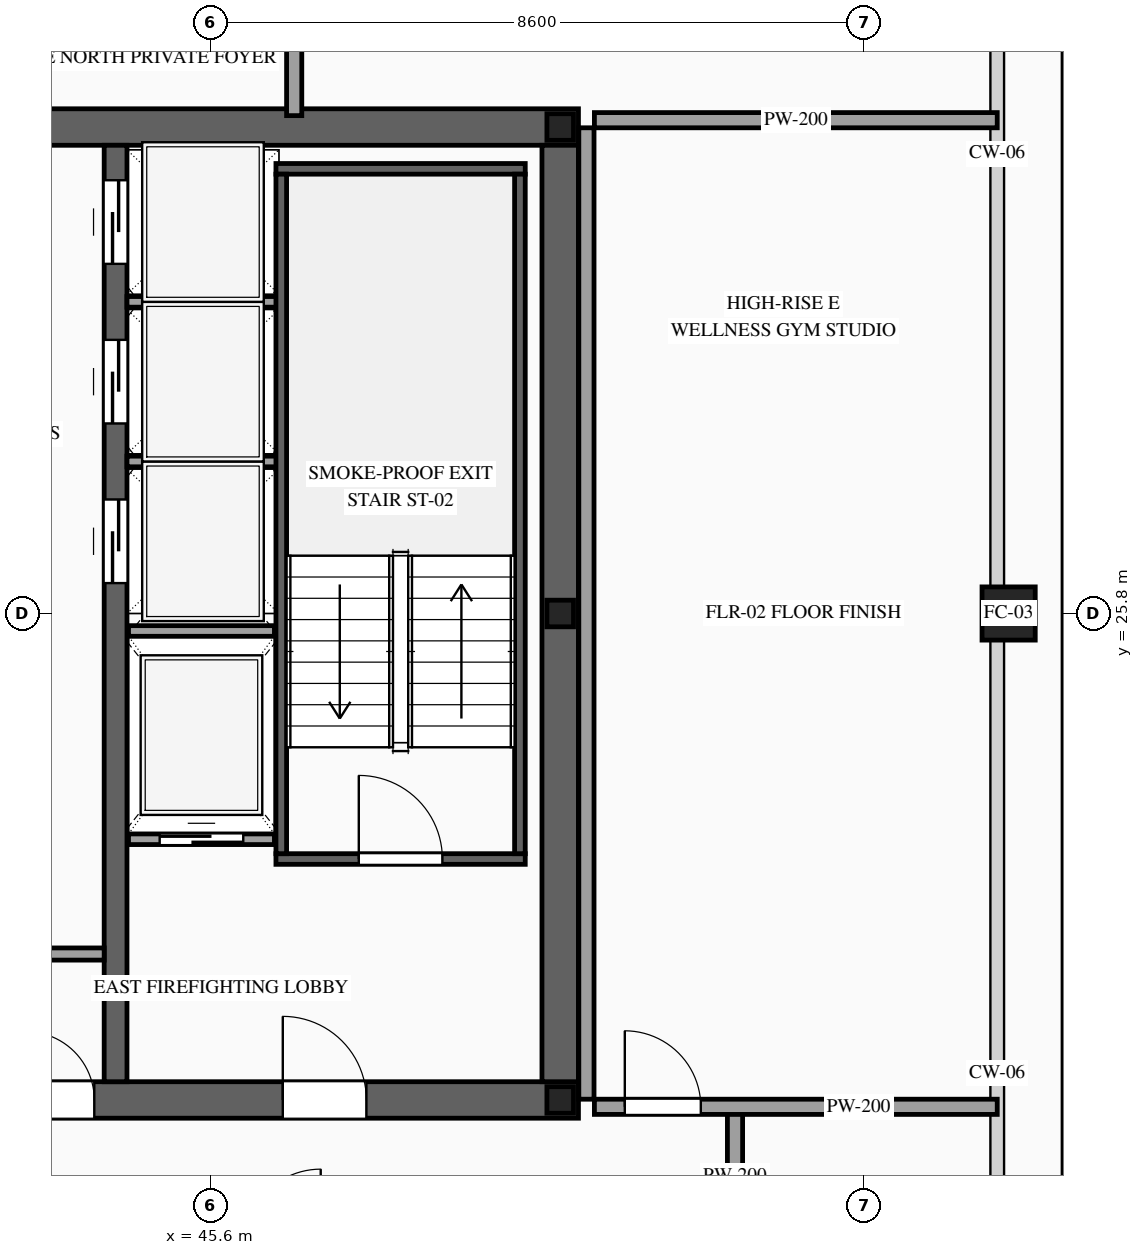
"""IFC4 building model, lengths in metres.
Left out: names, types, materials, properties, quantities, classifications, styles, units other than length and angle.
Written with IfcOpenShell. Run it as: python <this file> out.ifc"""

import sys

from ifc_helpers import new_model, si_unit, direction, frame, frame_2d, origin, origin_2d, place, context, subcontext, project, spatial, rectangle, hollow_rectangle, i_section, extrude, source, transform, mapped, element, fill, save


model = new_model("IFC4")
c1 = context("Model", 3, precision=1e-05, world=origin(), true_north=direction((0.0, 1.0)))
c2 = subcontext(c1, "Body", "Model", "MODEL_VIEW")
j1 = project(units=[si_unit("LENGTHUNIT", "METRE"), si_unit("PLANEANGLEUNIT", "RADIAN")], contexts=[c1])
p1 = place(None, origin())
s1 = spatial("IfcSite", under=j1, at=p1, CompositionType="ELEMENT")
p2 = place(p1, origin())
s2 = spatial("IfcBuilding", under=s1, at=p2, CompositionType="ELEMENT")
p3 = place(p2, frame((0.0, 0.0, 296.1)))
s3 = spatial("IfcBuildingStorey", under=s2, at=p3, CompositionType="ELEMENT", Elevation=296.1)
p4 = place(p3, frame((23.56, 19.4, 0.0), z_axis=(0.0, 0.0, 1.0), x_axis=(1.0, 0.0, 0.0)))
e1 = element("IfcWall", 1, at=p4, inside=s3, PredefinedType="SHEAR", context=c2, shape_type="SweptSolid", body=[
    extrude(rectangle(XDim=26.88, YDim=0.48, at=frame_2d((13.44, 0.0))), origin(), (0.0, 0.0, 1.0), 3.5),
])
p5 = place(p4, frame((1.89, 0.0, 0.0)))
e2 = element("IfcOpeningElement", 2, at=p5, cuts=e1, PredefinedType="OPENING", context=c2, shape_type="SweptSolid", body=[
    extrude(rectangle(XDim=1.1, YDim=2.2, at=frame_2d((0.55, 1.1))), frame((0.0, 0.255, 0.0), z_axis=(0.0, -1.0, 0.0), x_axis=(1.0, 0.0, 0.0)), (0.0, 0.0, 1.0), 0.51),
])
p6 = place(p4, frame((9.79, 0.0, 0.0)))
e3 = element("IfcOpeningElement", 3, at=p6, cuts=e1, PredefinedType="OPENING", context=c2, shape_type="SweptSolid", body=[
    extrude(rectangle(XDim=1.1, YDim=2.2, at=frame_2d((0.55, 1.1))), frame((0.0, 0.255, 0.0), z_axis=(0.0, -1.0, 0.0), x_axis=(1.0, 0.0, 0.0)), (0.0, 0.0, 1.0), 0.51),
])
p7 = place(p4, frame((22.99, 0.0, 0.0)))
e4 = element("IfcOpeningElement", 4, at=p7, cuts=e1, PredefinedType="OPENING", context=c2, shape_type="SweptSolid", body=[
    extrude(rectangle(XDim=1.1, YDim=2.2, at=frame_2d((0.55, 1.1))), frame((0.0, 0.255, 0.0), z_axis=(0.0, -1.0, 0.0), x_axis=(1.0, 0.0, 0.0)), (0.0, 0.0, 1.0), 0.51),
])
p8 = place(p4, frame((19.61, 0.0, 0.0)))
e5 = element("IfcOpeningElement", 5, at=p8, cuts=e1, PredefinedType="OPENING", context=c2, shape_type="SweptSolid", body=[
    extrude(rectangle(XDim=0.9, YDim=2.15, at=frame_2d((0.45, 1.075))), frame((0.0, 0.255, 0.0), z_axis=(0.0, -1.0, 0.0), x_axis=(1.0, 0.0, 0.0)), (0.0, 0.0, 1.0), 0.51),
])
p9 = place(p4, frame((18.17, 0.0, 0.0)))
e6 = element("IfcOpeningElement", 6, at=p9, cuts=e1, PredefinedType="OPENING", context=c2, shape_type="SweptSolid", body=[
    extrude(rectangle(XDim=0.9, YDim=2.15, at=frame_2d((0.45, 1.075))), frame((0.0, 0.255, 0.0), z_axis=(0.0, -1.0, 0.0), x_axis=(1.0, 0.0, 0.0)), (0.0, 0.0, 1.0), 0.51),
])
p10 = place(p3, frame((23.56, 32.2, 0.0), z_axis=(0.0, 0.0, 1.0), x_axis=(1.0, 0.0, 0.0)))
e7 = element("IfcWall", 7, at=p10, inside=s3, PredefinedType="SHEAR", context=c2, shape_type="SweptSolid", body=[
    extrude(rectangle(XDim=26.88, YDim=0.48, at=frame_2d((13.44, 0.0))), origin(), (0.0, 0.0, 1.0), 3.5),
])
p11 = place(p10, frame((4.51, 0.0, 0.0)))
e8 = element("IfcOpeningElement", 8, at=p11, cuts=e7, PredefinedType="OPENING", context=c2, shape_type="SweptSolid", body=[
    extrude(rectangle(XDim=0.9, YDim=2.15, at=frame_2d((0.45, 1.075))), frame((0.0, 0.255, 0.0), z_axis=(0.0, -1.0, 0.0), x_axis=(1.0, 0.0, 0.0)), (0.0, 0.0, 1.0), 0.51),
])
p12 = place(p10, frame((9.79, 0.0, 0.0)))
e9 = element("IfcOpeningElement", 9, at=p12, cuts=e7, PredefinedType="OPENING", context=c2, shape_type="SweptSolid", body=[
    extrude(rectangle(XDim=1.1, YDim=2.2, at=frame_2d((0.55, 1.1))), frame((0.0, 0.255, 0.0), z_axis=(0.0, -1.0, 0.0), x_axis=(1.0, 0.0, 0.0)), (0.0, 0.0, 1.0), 0.51),
])
p13 = place(p10, frame((15.64, 0.0, 0.0)))
e10 = element("IfcOpeningElement", 10, at=p13, cuts=e7, PredefinedType="OPENING", context=c2, shape_type="SweptSolid", body=[
    extrude(rectangle(XDim=1.1, YDim=2.2, at=frame_2d((0.55, 1.1))), frame((0.0, 0.255, 0.0), z_axis=(0.0, -1.0, 0.0), x_axis=(1.0, 0.0, 0.0)), (0.0, 0.0, 1.0), 0.51),
])
p14 = place(p10, frame((18.74, 0.0, 0.0)))
e11 = element("IfcOpeningElement", 11, at=p14, cuts=e7, PredefinedType="OPENING", context=c2, shape_type="SweptSolid", body=[
    extrude(rectangle(XDim=1.1, YDim=2.2, at=frame_2d((0.55, 1.1))), frame((0.0, 0.255, 0.0), z_axis=(0.0, -1.0, 0.0), x_axis=(1.0, 0.0, 0.0)), (0.0, 0.0, 1.0), 0.51),
])
m1 = source(origin(), c2, "Body", "SweptSolid", [
    extrude(rectangle(XDim=12.32, YDim=0.48, at=frame_2d((6.16, 0.0))), origin(), (0.0, 0.0, 1.0), 3.5),
])
p15 = place(p3, frame((50.2, 19.64, 0.0), z_axis=(0.0, 0.0, 1.0), x_axis=(0.0, 1.0, 0.0)))
e12 = element("IfcWall", 12, at=p15, inside=s3, PredefinedType="SHEAR", context=c2, shape_type="MappedRepresentation", body=[
    mapped(m1, transform((0.0, 0.0, 0.0), scale=1.0)),
])
p16 = place(p3, frame((44.35, 19.64, 0.0), z_axis=(0.0, 0.0, 1.0), x_axis=(0.0, 1.0, 0.0)))
e13 = element("IfcWall", 13, at=p16, inside=s3, PredefinedType="SOLIDWALL", context=c2, shape_type="SweptSolid", body=[
    extrude(rectangle(XDim=12.32, YDim=0.3, at=frame_2d((6.16, 0.0))), origin(), (0.0, 0.0, 1.0), 3.5),
])
p17 = place(p16, frame((6.56, 0.0, 0.0)))
e14 = element("IfcOpeningElement", 14, at=p17, cuts=e13, PredefinedType="OPENING", context=c2, shape_type="SweptSolid", body=[
    extrude(rectangle(XDim=1.1, YDim=2.2, at=frame_2d((0.55, 1.1))), frame((0.0, 0.165, 0.0), z_axis=(0.0, -1.0, 0.0), x_axis=(1.0, 0.0, 0.0)), (0.0, 0.0, 1.0), 0.33),
])
p18 = place(p16, frame((8.66, 0.0, 0.0)))
e15 = element("IfcOpeningElement", 15, at=p18, cuts=e13, PredefinedType="OPENING", context=c2, shape_type="SweptSolid", body=[
    extrude(rectangle(XDim=1.1, YDim=2.2, at=frame_2d((0.55, 1.1))), frame((0.0, 0.165, 0.0), z_axis=(0.0, -1.0, 0.0), x_axis=(1.0, 0.0, 0.0)), (0.0, 0.0, 1.0), 0.33),
])
p19 = place(p16, frame((10.76, 0.0, 0.0)))
e16 = element("IfcOpeningElement", 16, at=p19, cuts=e13, PredefinedType="OPENING", context=c2, shape_type="SweptSolid", body=[
    extrude(rectangle(XDim=1.1, YDim=2.2, at=frame_2d((0.55, 1.1))), frame((0.0, 0.165, 0.0), z_axis=(0.0, -1.0, 0.0), x_axis=(1.0, 0.0, 0.0)), (0.0, 0.0, 1.0), 0.33),
])
m2 = source(origin(), c2, "Body", "SweptSolid", [
    extrude(i_section(OverallWidth=0.35, OverallDepth=0.35, WebThickness=0.012, FlangeThickness=0.019, at=origin_2d()), origin(), (0.0, 0.0, 1.0), 3.5),
])
for number, where, z_axis, x_axis in (
    (17, (50.2, 19.4, 0.0), (0.0, 0.0, 1.0), (1.0, 0.0, 0.0)),
    (18, (50.2, 25.8, 0.0), (0.0, 0.0, 1.0), (1.0, 0.0, 0.0)),
    (19, (50.2, 32.2, 0.0), (0.0, 0.0, 1.0), (1.0, 0.0, 0.0)),
):
    element("IfcColumn", number, at=place(p3, frame(where, z_axis=z_axis, x_axis=x_axis)), inside=s3, PredefinedType="COLUMN", context=c2, shape_type="MappedRepresentation", body=[
        mapped(m2, transform((0.0, 0.0, 0.0), scale=1.0)),
    ])
m3 = source(origin(), c2, "Body", "SweptSolid", [
    extrude(hollow_rectangle(XDim=0.7, YDim=0.7, WallThickness=0.032, at=origin_2d()), origin(), (0.0, 0.0, 1.0), 3.5),
])
p20 = place(p3, frame((56.1, 25.8, 0.0), z_axis=(0.0, 0.0, 1.0), x_axis=(1.0, 0.0, 0.0)))
e20 = element("IfcColumn", 20, at=p20, inside=s3, PredefinedType="COLUMN", context=c2, shape_type="MappedRepresentation", body=[
    mapped(m3, transform((0.0, 0.0, 0.0), scale=1.0)),
])
p21 = place(p3, frame((44.52, 22.83, 0.0), z_axis=(0.0, 0.0, 1.0), x_axis=(1.0, 0.0, 0.0)))
e21 = element("IfcWall", 21, at=p21, inside=s3, PredefinedType="SOLIDWALL", context=c2, shape_type="SweptSolid", body=[
    extrude(rectangle(XDim=1.92, YDim=0.14, at=frame_2d((0.96, 0.0))), origin(), (0.0, 0.0, 1.0), 3.28),
])
p22 = place(p21, frame((0.41, 0.0, 0.0)))
e22 = element("IfcOpeningElement", 22, at=p22, cuts=e21, PredefinedType="OPENING", context=c2, shape_type="SweptSolid", body=[
    extrude(rectangle(XDim=1.1, YDim=2.2, at=frame_2d((0.55, 1.1))), frame((0.0, 0.085, 0.0), z_axis=(0.0, -1.0, 0.0), x_axis=(1.0, 0.0, 0.0)), (0.0, 0.0, 1.0), 0.17),
])
m4 = source(origin(), c2, "Body", "SweptSolid", [
    extrude(rectangle(XDim=1.92, YDim=0.14, at=frame_2d((0.96, 0.0))), origin(), (0.0, 0.0, 1.0), 3.28),
])
p23 = place(p3, frame((44.52, 25.57, 0.0), z_axis=(0.0, 0.0, 1.0), x_axis=(1.0, 0.0, 0.0)))
e23 = element("IfcWall", 23, at=p23, inside=s3, PredefinedType="SOLIDWALL", context=c2, shape_type="MappedRepresentation", body=[
    mapped(m4, transform((0.0, 0.0, 0.0), scale=1.0)),
])
m5 = source(origin(), c2, "Body", "SweptSolid", [
    extrude(rectangle(XDim=2.0, YDim=0.14, at=frame_2d((1.0, 0.0))), origin(), (0.0, 0.0, 1.0), 3.28),
])
for number, where, z_axis, x_axis in (
    (24, (44.5, 27.8, 0.0), (0.0, 0.0, 1.0), (1.0, 0.0, 0.0)),
    (25, (44.5, 29.9, 0.0), (0.0, 0.0, 1.0), (1.0, 0.0, 0.0)),
):
    element("IfcWall", number, at=place(p3, frame(where, z_axis=z_axis, x_axis=x_axis)), inside=s3, PredefinedType="SOLIDWALL", context=c2, shape_type="MappedRepresentation", body=[
        mapped(m5, transform((0.0, 0.0, 0.0), scale=1.0)),
    ])
p24 = place(p3, frame((46.46, 22.57, 0.0), z_axis=(0.0, 0.0, 1.0), x_axis=(1.0, 0.0, 0.0)))
e26 = element("IfcWall", 26, at=p24, inside=s3, PredefinedType="SOLIDWALL", context=c2, shape_type="SweptSolid", body=[
    extrude(rectangle(XDim=3.28, YDim=0.14, at=frame_2d((1.64, 0.0))), origin(), (0.0, 0.0, 1.0), 3.28),
])
p25 = place(p24, frame((1.09, 0.0, 0.0)))
e27 = element("IfcOpeningElement", 27, at=p25, cuts=e26, PredefinedType="OPENING", context=c2, shape_type="SweptSolid", body=[
    extrude(rectangle(XDim=1.1, YDim=2.2, at=frame_2d((0.55, 1.1))), frame((0.0, 0.085, 0.0), z_axis=(0.0, -1.0, 0.0), x_axis=(1.0, 0.0, 0.0)), (0.0, 0.0, 1.0), 0.17),
])
m6 = source(origin(), c2, "Body", "SweptSolid", [
    extrude(rectangle(XDim=3.28, YDim=0.14, at=frame_2d((1.64, 0.0))), origin(), (0.0, 0.0, 1.0), 3.28),
])
p26 = place(p3, frame((46.46, 31.65, 0.0), z_axis=(0.0, 0.0, 1.0), x_axis=(1.0, 0.0, 0.0)))
e28 = element("IfcWall", 28, at=p26, inside=s3, PredefinedType="SOLIDWALL", context=c2, shape_type="MappedRepresentation", body=[
    mapped(m6, transform((0.0, 0.0, 0.0), scale=1.0)),
])
m7 = source(origin(), c2, "Body", "SweptSolid", [
    extrude(rectangle(XDim=8.94, YDim=0.14, at=frame_2d((4.47, 0.0))), origin(), (0.0, 0.0, 1.0), 3.28),
])
for number, where, z_axis, x_axis in (
    (29, (46.53, 22.64, 0.0), (0.0, 0.0, 1.0), (0.0, 1.0, 0.0)),
    (30, (49.67, 22.64, 0.0), (0.0, 0.0, 1.0), (0.0, 1.0, 0.0)),
):
    element("IfcWall", number, at=place(p3, frame(where, z_axis=z_axis, x_axis=x_axis)), inside=s3, PredefinedType="SOLIDWALL", context=c2, shape_type="MappedRepresentation", body=[
        mapped(m7, transform((0.0, 0.0, 0.0), scale=1.0)),
    ])
m8 = source(origin(), c2, "Body", "SweptSolid", [
    extrude(rectangle(XDim=1.17, YDim=0.16, at=frame_2d((0.585, 0.0))), origin(), (0.0, 0.0, 1.0), 3.28),
])
p27 = place(p3, frame((43.03, 21.32, 0.0), z_axis=(0.0, 0.0, 1.0), x_axis=(1.0, 0.0, 0.0)))
e31 = element("IfcWall", 31, at=p27, inside=s3, PredefinedType="PARTITIONING", context=c2, shape_type="MappedRepresentation", body=[
    mapped(m8, transform((0.0, 0.0, 0.0), scale=1.0)),
])
m9 = source(origin(), c2, "Body", "SweptSolid", [
    extrude(rectangle(XDim=1.7, YDim=0.2, at=frame_2d((0.85, 0.0))), origin(), (0.0, 0.0, 1.0), 3.28),
])
for number, where, z_axis, x_axis in (
    (32, (46.7, 32.35, 0.0), (0.0, 0.0, 1.0), (0.0, 1.0, 0.0)),
    (33, (52.5, 17.55, 0.0), (0.0, 0.0, 1.0), (0.0, 1.0, 0.0)),
):
    element("IfcWall", number, at=place(p3, frame(where, z_axis=z_axis, x_axis=x_axis)), inside=s3, PredefinedType="PARTITIONING", context=c2, shape_type="MappedRepresentation", body=[
        mapped(m9, transform((0.0, 0.0, 0.0), scale=1.0)),
    ])
p28 = place(p3, frame((50.65, 19.31, 0.0), z_axis=(0.0, 0.0, 1.0), x_axis=(1.0, 0.0, 0.0)))
e34 = element("IfcWall", 34, at=p28, inside=s3, PredefinedType="PARTITIONING", context=c2, shape_type="SweptSolid", body=[
    extrude(rectangle(XDim=5.3, YDim=0.2, at=frame_2d((2.65, 0.0))), origin(), (0.0, 0.0, 1.0), 2.825),
])
p29 = place(p28, frame((0.4, 0.0, 0.0)))
e35 = element("IfcOpeningElement", 35, at=p29, cuts=e34, PredefinedType="OPENING", context=c2, shape_type="SweptSolid", body=[
    extrude(rectangle(XDim=1.0, YDim=2.2, at=frame_2d((0.5, 1.1))), frame((0.0, 0.115, 0.0), z_axis=(0.0, -1.0, 0.0), x_axis=(1.0, 0.0, 0.0)), (0.0, 0.0, 1.0), 0.23),
])
m10 = source(origin(), c2, "Body", "SweptSolid", [
    extrude(rectangle(XDim=5.3, YDim=0.2, at=frame_2d((2.65, 0.0))), origin(), (0.0, 0.0, 1.0), 2.825),
])
p30 = place(p3, frame((50.65, 32.29, 0.0), z_axis=(0.0, 0.0, 1.0), x_axis=(1.0, 0.0, 0.0)))
e36 = element("IfcWall", 36, at=p30, inside=s3, PredefinedType="PARTITIONING", context=c2, shape_type="MappedRepresentation", body=[
    mapped(m10, transform((0.0, 0.0, 0.0), scale=1.0)),
])
m11 = source(origin(), c2, "Body", "SweptSolid", [
    extrude(rectangle(XDim=12.78, YDim=0.2, at=frame_2d((6.39, 0.0))), origin(), (0.0, 0.0, 1.0), 3.28),
])
p31 = place(p3, frame((50.545, 19.41, 0.0), z_axis=(0.0, 0.0, 1.0), x_axis=(0.0, 1.0, 0.0)))
e37 = element("IfcWall", 37, at=p31, inside=s3, PredefinedType="PARTITIONING", context=c2, shape_type="MappedRepresentation", body=[
    mapped(m11, transform((0.0, 0.0, 0.0), scale=1.0)),
])
m12 = source(origin(), c2, "Body", "SweptSolid", [
    extrude(rectangle(XDim=1.1, YDim=2.2, at=frame_2d((0.55, 1.1))), frame((0.0, 0.025, 0.0), z_axis=(0.0, -1.0, 0.0), x_axis=(1.0, 0.0, 0.0)), (0.0, 0.0, 1.0), 0.05),
])
p32 = place(p22, origin())
e38 = element("IfcDoor", 38, at=p32, inside=s3, OperationType="SLIDING_TO_RIGHT", PredefinedType="DOOR", context=c2, shape_type="MappedRepresentation", body=[
    mapped(m12, transform((0.0, 0.0, 0.0), scale=1.0)),
])
fill(e22, e38)
p33 = place(p17, origin())
e39 = element("IfcDoor", 39, at=p33, inside=s3, OperationType="SLIDING_TO_LEFT", PredefinedType="DOOR", context=c2, shape_type="MappedRepresentation", body=[
    mapped(m12, transform((0.0, 0.0, 0.0), scale=1.0)),
])
fill(e14, e39)
p34 = place(p18, origin())
e40 = element("IfcDoor", 40, at=p34, inside=s3, OperationType="SLIDING_TO_RIGHT", PredefinedType="DOOR", context=c2, shape_type="MappedRepresentation", body=[
    mapped(m12, transform((0.0, 0.0, 0.0), scale=1.0)),
])
fill(e15, e40)
p35 = place(p19, origin())
e41 = element("IfcDoor", 41, at=p35, inside=s3, OperationType="SLIDING_TO_LEFT", PredefinedType="DOOR", context=c2, shape_type="MappedRepresentation", body=[
    mapped(m12, transform((0.0, 0.0, 0.0), scale=1.0)),
])
fill(e16, e41)
m13 = source(origin(), c2, "Body", "SweptSolid", [
    extrude(rectangle(XDim=1.1, YDim=2.2, at=frame_2d((0.55, 1.1))), frame((0.0, 0.025, 0.0), z_axis=(0.0, -1.0, 0.0), x_axis=(1.0, 0.0, 0.0)), (0.0, 0.0, 1.0), 0.05),
])
p36 = place(p25, origin())
e42 = element("IfcDoor", 42, at=p36, inside=s3, OperationType="SINGLE_SWING_LEFT", PredefinedType="DOOR", context=c2, shape_type="MappedRepresentation", body=[
    mapped(m13, transform((0.0, 0.0, 0.0), scale=1.0)),
])
fill(e27, e42)
p37 = place(p7, origin())
e43 = element("IfcDoor", 43, at=p37, inside=s3, OperationType="SINGLE_SWING_LEFT", PredefinedType="DOOR", context=c2, shape_type="MappedRepresentation", body=[
    mapped(m13, transform((0.0, 0.0, 0.0), scale=1.0)),
])
fill(e4, e43)
m14 = source(origin(), c2, "Body", "SweptSolid", [
    extrude(rectangle(XDim=0.9, YDim=2.15, at=frame_2d((0.45, 1.075))), frame((0.0, 0.025, 0.0), z_axis=(0.0, -1.0, 0.0), x_axis=(1.0, 0.0, 0.0)), (0.0, 0.0, 1.0), 0.05),
])
p38 = place(p8, origin())
e44 = element("IfcDoor", 44, at=p38, inside=s3, OperationType="SINGLE_SWING_LEFT", PredefinedType="DOOR", context=c2, shape_type="MappedRepresentation", body=[
    mapped(m14, transform((0.0, 0.0, 0.0), scale=1.0)),
])
fill(e5, e44)
m15 = source(origin(), c2, "Body", "SweptSolid", [
    extrude(rectangle(XDim=1.0, YDim=2.2, at=frame_2d((0.5, 1.1))), frame((0.0, 0.025, 0.0), z_axis=(0.0, -1.0, 0.0), x_axis=(1.0, 0.0, 0.0)), (0.0, 0.0, 1.0), 0.05),
])
p39 = place(p29, origin())
e45 = element("IfcDoor", 45, at=p39, inside=s3, OperationType="SINGLE_SWING_LEFT", PredefinedType="DOOR", context=c2, shape_type="MappedRepresentation", body=[
    mapped(m15, transform((0.0, 0.0, 0.0), scale=1.0)),
])
fill(e35, e45)
save(model, sys.argv[1])
